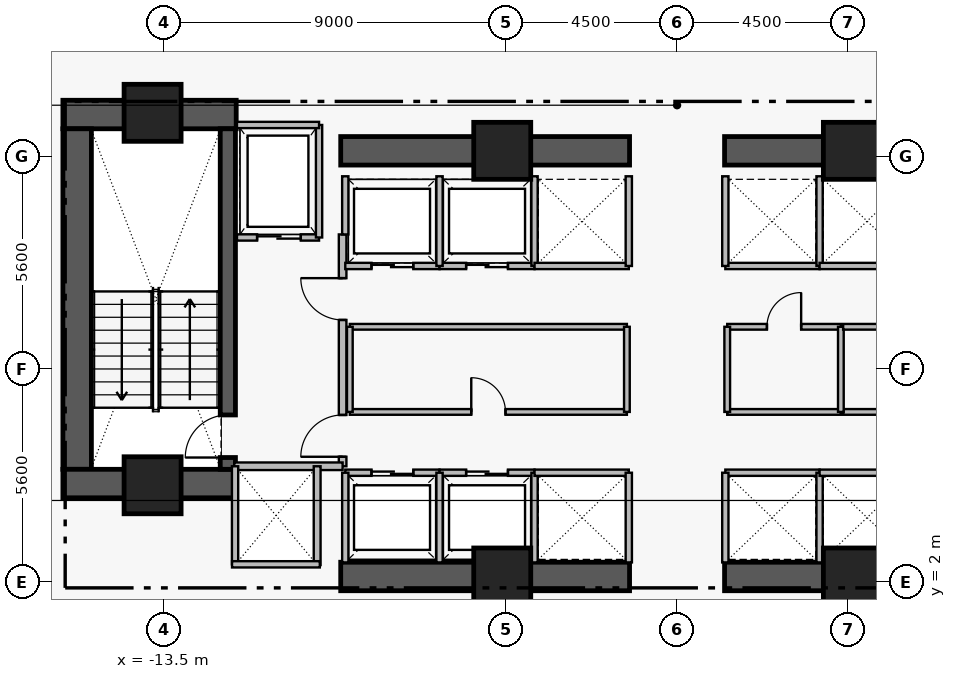
"""IFC4 building model, lengths in metres.
Left out: names, types, materials, properties, quantities, classifications, styles, units other than length and angle.
Written with IfcOpenShell. Run it as: python <this file> out.ifc"""

import sys

from ifc_helpers import new_model, si_unit, direction, frame, frame_2d, origin, origin_2d, place, context, subcontext, project, spatial, rectangle, extrude, element, fill, save


model = new_model("IFC4")
c1 = context("Model", 3, precision=1e-05, world=origin(), true_north=direction((0.0, 1.0)))
c2 = subcontext(c1, "Body", "Model", "MODEL_VIEW")
j1 = project(units=[si_unit("LENGTHUNIT", "METRE"), si_unit("PLANEANGLEUNIT", "RADIAN")], contexts=[c1])
p1 = place(None, origin())
s1 = spatial("IfcSite", under=j1, at=p1, CompositionType="ELEMENT")
p2 = place(p1, origin())
s2 = spatial("IfcBuilding", under=s1, at=p2, CompositionType="ELEMENT")
p3 = place(p2, frame((0.0, 0.0, 121.2)))
s3 = spatial("IfcBuildingStorey", under=s2, at=p3, CompositionType="ELEMENT", Elevation=121.2)
p4 = place(p3, frame((-16.16, 14.305, 0.0), z_axis=(0.0, 0.0, 1.0), x_axis=(1.0, 0.0, 0.0)))
e1 = element("IfcWall", 1, at=p4, inside=s3, PredefinedType="SHEAR", context=c2, shape_type="SweptSolid", body=[
    extrude(rectangle(XDim=4.56, YDim=0.75, at=frame_2d((2.28, 0.0))), origin(), (0.0, 0.0, 1.0), 3.46),
])
p5 = place(p3, frame((-15.785, 4.97, 0.0), z_axis=(0.0, 0.0, 1.0), x_axis=(0.0, 1.0, 0.0)))
e2 = element("IfcWall", 2, at=p5, inside=s3, PredefinedType="SHEAR", context=c2, shape_type="SweptSolid", body=[
    extrude(rectangle(XDim=8.96, YDim=0.75, at=frame_2d((4.48, 0.0))), origin(), (0.0, 0.0, 1.0), 3.46),
])
p6 = place(p3, frame((-16.16, 4.595, 0.0), z_axis=(0.0, 0.0, 1.0), x_axis=(1.0, 0.0, 0.0)))
e3 = element("IfcWall", 3, at=p6, inside=s3, PredefinedType="SHEAR", context=c2, shape_type="SweptSolid", body=[
    extrude(rectangle(XDim=4.56, YDim=0.75, at=frame_2d((2.28, 0.0))), origin(), (0.0, 0.0, 1.0), 3.46),
])
for number, where, z_axis, x_axis in (
    (4, (-8.85, 2.15, 0.0), (0.0, 0.0, 1.0), (1.0, 0.0, 0.0)),
    (5, (1.25, 2.15, 0.0), (0.0, 0.0, 1.0), (1.0, 0.0, 0.0)),
    (6, (-8.85, 13.35, 0.0), (0.0, 0.0, 1.0), (1.0, 0.0, 0.0)),
    (7, (1.25, 13.35, 0.0), (0.0, 0.0, 1.0), (1.0, 0.0, 0.0)),
):
    element("IfcWall", number, at=place(p3, frame(where, z_axis=z_axis, x_axis=x_axis)), inside=s3, PredefinedType="SHEAR", context=c2, shape_type="SweptSolid", body=[
        extrude(rectangle(XDim=7.6, YDim=0.75, at=frame_2d((3.8, 0.0))), origin(), (0.0, 0.0, 1.0), 3.43),
    ])
p7 = place(p3, frame((-11.82, 4.97, 0.0), z_axis=(0.0, 0.0, 1.0), x_axis=(0.0, 1.0, 0.0)))
e8 = element("IfcWall", 8, at=p7, inside=s3, PredefinedType="SHEAR", context=c2, shape_type="SweptSolid", body=[
    extrude(rectangle(XDim=8.96, YDim=0.4, at=frame_2d((4.48, 0.0))), origin(), (0.0, 0.0, 1.0), 3.46),
])
p8 = place(p7, frame((0.31, 0.0, 0.0)))
e9 = element("IfcOpeningElement", 9, at=p8, cuts=e8, PredefinedType="OPENING", context=c2, shape_type="SweptSolid", body=[
    extrude(rectangle(XDim=1.12, YDim=2.22, at=frame_2d((0.56, 1.11))), frame((0.0, 0.21, 0.0), z_axis=(0.0, -1.0, 0.0), x_axis=(1.0, 0.0, 0.0)), (0.0, 0.0, 1.0), 0.42),
])
for number, where, z_axis, x_axis in (
    (10, (-13.8, 14.35, 0.0), (0.0, 0.0, 1.0), (1.0, 0.0, 0.0)),
    (11, (-4.6, 13.35, 0.0), (0.0, 0.0, 1.0), (1.0, 0.0, 0.0)),
    (12, (4.6, 13.35, 0.0), (0.0, 0.0, 1.0), (1.0, 0.0, 0.0)),
    (13, (-13.8, 4.55, 0.0), (0.0, 0.0, 1.0), (1.0, 0.0, 0.0)),
    (14, (-4.6, 2.15, 0.0), (0.0, 0.0, 1.0), (1.0, 0.0, 0.0)),
    (15, (4.6, 2.15, 0.0), (0.0, 0.0, 1.0), (1.0, 0.0, 0.0)),
):
    element("IfcColumn", number, at=place(p3, frame(where, z_axis=z_axis, x_axis=x_axis)), inside=s3, PredefinedType="COLUMN", context=c2, shape_type="SweptSolid", body=[
        extrude(rectangle(XDim=1.5, YDim=1.5, at=origin_2d()), origin(), (0.0, 0.0, 1.0), 3.65),
    ])
p9 = place(p3, frame((-8.8, 5.05, 0.0), z_axis=(0.0, 0.0, 1.0), x_axis=(0.0, 1.0, 0.0)))
e16 = element("IfcWall", 16, at=p9, inside=s3, PredefinedType="PARTITIONING", context=c2, shape_type="SweptSolid", body=[
    extrude(rectangle(XDim=6.1, YDim=0.2, at=frame_2d((3.05, 0.0))), origin(), (0.0, 0.0, 1.0), 3.43),
])
p10 = place(p9, frame((0.25, 0.0, 0.0)))
e17 = element("IfcOpeningElement", 17, at=p10, cuts=e16, PredefinedType="OPENING", context=c2, shape_type="SweptSolid", body=[
    extrude(rectangle(XDim=1.1, YDim=2.2, at=frame_2d((0.55, 1.1))), frame((0.0, 0.11, 0.0), z_axis=(0.0, -1.0, 0.0), x_axis=(1.0, 0.0, 0.0)), (0.0, 0.0, 1.0), 0.22),
])
p11 = place(p9, frame((3.85, 0.0, 0.0)))
e18 = element("IfcOpeningElement", 18, at=p11, cuts=e16, PredefinedType="OPENING", context=c2, shape_type="SweptSolid", body=[
    extrude(rectangle(XDim=1.1, YDim=2.2, at=frame_2d((0.55, 1.1))), frame((0.0, 0.11, 0.0), z_axis=(0.0, -1.0, 0.0), x_axis=(1.0, 0.0, 0.0)), (0.0, 0.0, 1.0), 0.22),
])
p12 = place(p3, frame((-11.58, 11.07, 0.0), z_axis=(0.0, 0.0, 1.0), x_axis=(1.0, 0.0, 0.0)))
e19 = element("IfcWall", 19, at=p12, inside=s3, PredefinedType="PARTITIONING", context=c2, shape_type="SweptSolid", body=[
    extrude(rectangle(XDim=2.16, YDim=0.165, at=frame_2d((1.08, 0.0))), origin(), (0.0, 0.0, 1.0), 3.43),
])
p13 = place(p12, frame((0.53, 0.0, 0.0)))
e20 = element("IfcOpeningElement", 20, at=p13, cuts=e19, PredefinedType="OPENING", context=c2, shape_type="SweptSolid", body=[
    extrude(rectangle(XDim=1.15, YDim=2.25, at=frame_2d((0.575, 1.125))), frame((0.0, 0.093, 0.0), z_axis=(0.0, -1.0, 0.0), x_axis=(1.0, 0.0, 0.0)), (0.0, 0.0, 1.0), 0.185),
])
p14 = place(p3, frame((-8.73, 4.88, 0.0), z_axis=(0.0, 0.0, 1.0), x_axis=(1.0, 0.0, 0.0)))
e21 = element("IfcWall", 21, at=p14, inside=s3, PredefinedType="PARTITIONING", context=c2, shape_type="SweptSolid", body=[
    extrude(rectangle(XDim=2.48, YDim=0.165, at=frame_2d((1.24, 0.0))), origin(), (0.0, 0.0, 1.0), 3.43),
])
p15 = place(p14, frame((0.69, 0.0, 0.0)))
e22 = element("IfcOpeningElement", 22, at=p15, cuts=e21, PredefinedType="OPENING", context=c2, shape_type="SweptSolid", body=[
    extrude(rectangle(XDim=1.1, YDim=2.25, at=frame_2d((0.55, 1.125))), frame((0.0, 0.093, 0.0), z_axis=(0.0, -1.0, 0.0), x_axis=(1.0, 0.0, 0.0)), (0.0, 0.0, 1.0), 0.185),
])
p16 = place(p3, frame((-6.25, 4.88, 0.0), z_axis=(0.0, 0.0, 1.0), x_axis=(1.0, 0.0, 0.0)))
e23 = element("IfcWall", 23, at=p16, inside=s3, PredefinedType="PARTITIONING", context=c2, shape_type="SweptSolid", body=[
    extrude(rectangle(XDim=2.5, YDim=0.165, at=frame_2d((1.25, 0.0))), origin(), (0.0, 0.0, 1.0), 3.43),
])
p17 = place(p16, frame((0.7, 0.0, 0.0)))
e24 = element("IfcOpeningElement", 24, at=p17, cuts=e23, PredefinedType="OPENING", context=c2, shape_type="SweptSolid", body=[
    extrude(rectangle(XDim=1.1, YDim=2.25, at=frame_2d((0.55, 1.125))), frame((0.0, 0.093, 0.0), z_axis=(0.0, -1.0, 0.0), x_axis=(1.0, 0.0, 0.0)), (0.0, 0.0, 1.0), 0.185),
])
p18 = place(p3, frame((-8.73, 10.32, 0.0), z_axis=(0.0, 0.0, 1.0), x_axis=(1.0, 0.0, 0.0)))
e25 = element("IfcWall", 25, at=p18, inside=s3, PredefinedType="PARTITIONING", context=c2, shape_type="SweptSolid", body=[
    extrude(rectangle(XDim=2.48, YDim=0.165, at=frame_2d((1.24, 0.0))), origin(), (0.0, 0.0, 1.0), 3.43),
])
p19 = place(p18, frame((0.69, 0.0, 0.0)))
e26 = element("IfcOpeningElement", 26, at=p19, cuts=e25, PredefinedType="OPENING", context=c2, shape_type="SweptSolid", body=[
    extrude(rectangle(XDim=1.1, YDim=2.25, at=frame_2d((0.55, 1.125))), frame((0.0, 0.093, 0.0), z_axis=(0.0, -1.0, 0.0), x_axis=(1.0, 0.0, 0.0)), (0.0, 0.0, 1.0), 0.185),
])
p20 = place(p3, frame((-6.25, 10.32, 0.0), z_axis=(0.0, 0.0, 1.0), x_axis=(1.0, 0.0, 0.0)))
e27 = element("IfcWall", 27, at=p20, inside=s3, PredefinedType="PARTITIONING", context=c2, shape_type="SweptSolid", body=[
    extrude(rectangle(XDim=2.5, YDim=0.165, at=frame_2d((1.25, 0.0))), origin(), (0.0, 0.0, 1.0), 3.43),
])
p21 = place(p20, frame((0.7, 0.0, 0.0)))
e28 = element("IfcOpeningElement", 28, at=p21, cuts=e27, PredefinedType="OPENING", context=c2, shape_type="SweptSolid", body=[
    extrude(rectangle(XDim=1.1, YDim=2.25, at=frame_2d((0.55, 1.125))), frame((0.0, 0.093, 0.0), z_axis=(0.0, -1.0, 0.0), x_axis=(1.0, 0.0, 0.0)), (0.0, 0.0, 1.0), 0.185),
])
p22 = place(p3, frame((-8.61, 6.48, 0.0), z_axis=(0.0, 0.0, 1.0), x_axis=(1.0, 0.0, 0.0)))
e29 = element("IfcWall", 29, at=p22, inside=s3, PredefinedType="PARTITIONING", context=c2, shape_type="SweptSolid", body=[
    extrude(rectangle(XDim=7.29, YDim=0.15, at=frame_2d((3.645, 0.0))), origin(), (0.0, 0.0, 1.0), 3.43),
])
p23 = place(p22, frame((3.195, 0.0, 0.0)))
e30 = element("IfcOpeningElement", 30, at=p23, cuts=e29, PredefinedType="OPENING", context=c2, shape_type="SweptSolid", body=[
    extrude(rectangle(XDim=0.9, YDim=2.15, at=frame_2d((0.45, 1.075))), frame((0.0, 0.085, 0.0), z_axis=(0.0, -1.0, 0.0), x_axis=(1.0, 0.0, 0.0)), (0.0, 0.0, 1.0), 0.17),
])
p24 = place(p3, frame((1.32, 8.72, 0.0), z_axis=(0.0, 0.0, 1.0), x_axis=(1.0, 0.0, 0.0)))
e31 = element("IfcWall", 31, at=p24, inside=s3, PredefinedType="PARTITIONING", context=c2, shape_type="SweptSolid", body=[
    extrude(rectangle(XDim=2.99, YDim=0.15, at=frame_2d((1.495, 0.0))), origin(), (0.0, 0.0, 1.0), 3.43),
])
p25 = place(p24, frame((1.045, 0.0, 0.0)))
e32 = element("IfcOpeningElement", 32, at=p25, cuts=e31, PredefinedType="OPENING", context=c2, shape_type="SweptSolid", body=[
    extrude(rectangle(XDim=0.9, YDim=2.15, at=frame_2d((0.45, 1.075))), frame((0.0, 0.085, 0.0), z_axis=(0.0, -1.0, 0.0), x_axis=(1.0, 0.0, 0.0)), (0.0, 0.0, 1.0), 0.17),
])
p26 = place(p3, frame((4.37, 6.48, 0.0), z_axis=(0.0, 0.0, 1.0), x_axis=(1.0, 0.0, 0.0)))
e33 = element("IfcWall", 33, at=p26, inside=s3, PredefinedType="PARTITIONING", context=c2, shape_type="SweptSolid", body=[
    extrude(rectangle(XDim=4.24, YDim=0.15, at=frame_2d((2.12, 0.0))), origin(), (0.0, 0.0, 1.0), 3.43),
])
p27 = place(p26, frame((1.67, 0.0, 0.0)))
e34 = element("IfcOpeningElement", 34, at=p27, cuts=e33, PredefinedType="OPENING", context=c2, shape_type="SweptSolid", body=[
    extrude(rectangle(XDim=0.9, YDim=2.15, at=frame_2d((0.45, 1.075))), frame((0.0, 0.085, 0.0), z_axis=(0.0, -1.0, 0.0), x_axis=(1.0, 0.0, 0.0)), (0.0, 0.0, 1.0), 0.17),
])
p28 = place(p3, frame((-11.65, 5.05, 0.0), z_axis=(0.0, 0.0, 1.0), x_axis=(1.0, 0.0, 0.0)))
e35 = element("IfcWall", 35, at=p28, inside=s3, PredefinedType="PARTITIONING", context=c2, shape_type="SweptSolid", body=[
    extrude(rectangle(XDim=2.85, YDim=0.2, at=frame_2d((1.425, 0.0))), origin(), (0.0, 0.0, 1.0), 3.43),
])
p29 = place(p3, frame((-9.42, 11.07, 0.0), z_axis=(0.0, 0.0, 1.0), x_axis=(0.0, 1.0, 0.0)))
e36 = element("IfcWall", 36, at=p29, inside=s3, PredefinedType="PARTITIONING", context=c2, shape_type="SweptSolid", body=[
    extrude(rectangle(XDim=2.96, YDim=0.165, at=frame_2d((1.48, 0.0))), origin(), (0.0, 0.0, 1.0), 3.43),
])
p30 = place(p3, frame((-11.58, 14.03, 0.0), z_axis=(0.0, 0.0, 1.0), x_axis=(1.0, 0.0, 0.0)))
e37 = element("IfcWall", 37, at=p30, inside=s3, PredefinedType="PARTITIONING", context=c2, shape_type="SweptSolid", body=[
    extrude(rectangle(XDim=2.16, YDim=0.165, at=frame_2d((1.08, 0.0))), origin(), (0.0, 0.0, 1.0), 3.43),
])
for number, where, z_axis, x_axis in (
    (38, (-8.73, 2.52, 0.0), (0.0, 0.0, 1.0), (0.0, 1.0, 0.0)),
    (39, (-6.25, 2.52, 0.0), (0.0, 0.0, 1.0), (0.0, 1.0, 0.0)),
    (40, (-3.75, 2.52, 0.0), (0.0, 0.0, 1.0), (0.0, 1.0, 0.0)),
):
    element("IfcWall", number, at=place(p3, frame(where, z_axis=z_axis, x_axis=x_axis)), inside=s3, PredefinedType="PARTITIONING", context=c2, shape_type="SweptSolid", body=[
        extrude(rectangle(XDim=2.36, YDim=0.165, at=frame_2d((1.18, 0.0))), origin(), (0.0, 0.0, 1.0), 3.43),
    ])
p31 = place(p3, frame((-8.73, 11.15, 0.0), z_axis=(0.0, 0.0, 1.0), x_axis=(0.0, 1.0, 0.0)))
e41 = element("IfcWall", 41, at=p31, inside=s3, PredefinedType="PARTITIONING", context=c2, shape_type="SweptSolid", body=[
    extrude(rectangle(XDim=1.53, YDim=0.165, at=frame_2d((0.765, 0.0))), origin(), (0.0, 0.0, 1.0), 3.43),
])
for number, where, z_axis, x_axis in (
    (42, (-6.25, 10.32, 0.0), (0.0, 0.0, 1.0), (0.0, 1.0, 0.0)),
    (43, (-3.75, 10.32, 0.0), (0.0, 0.0, 1.0), (0.0, 1.0, 0.0)),
):
    element("IfcWall", number, at=place(p3, frame(where, z_axis=z_axis, x_axis=x_axis)), inside=s3, PredefinedType="PARTITIONING", context=c2, shape_type="SweptSolid", body=[
        extrude(rectangle(XDim=2.36, YDim=0.165, at=frame_2d((1.18, 0.0))), origin(), (0.0, 0.0, 1.0), 3.43),
    ])
p32 = place(p3, frame((-3.75, 4.88, 0.0), z_axis=(0.0, 0.0, 1.0), x_axis=(1.0, 0.0, 0.0)))
e44 = element("IfcWall", 44, at=p32, inside=s3, PredefinedType="PARTITIONING", context=c2, shape_type="SweptSolid", body=[
    extrude(rectangle(XDim=2.48, YDim=0.165, at=frame_2d((1.24, 0.0))), origin(), (0.0, 0.0, 1.0), 3.43),
])
p33 = place(p3, frame((-1.27, 2.52, 0.0), z_axis=(0.0, 0.0, 1.0), x_axis=(0.0, 1.0, 0.0)))
e45 = element("IfcWall", 45, at=p33, inside=s3, PredefinedType="PARTITIONING", context=c2, shape_type="SweptSolid", body=[
    extrude(rectangle(XDim=2.36, YDim=0.165, at=frame_2d((1.18, 0.0))), origin(), (0.0, 0.0, 1.0), 3.43),
])
p34 = place(p3, frame((1.27, 4.88, 0.0), z_axis=(0.0, 0.0, 1.0), x_axis=(1.0, 0.0, 0.0)))
e46 = element("IfcWall", 46, at=p34, inside=s3, PredefinedType="PARTITIONING", context=c2, shape_type="SweptSolid", body=[
    extrude(rectangle(XDim=2.48, YDim=0.165, at=frame_2d((1.24, 0.0))), origin(), (0.0, 0.0, 1.0), 3.43),
])
for number, where, z_axis, x_axis in (
    (47, (1.27, 2.52, 0.0), (0.0, 0.0, 1.0), (0.0, 1.0, 0.0)),
    (48, (3.75, 2.52, 0.0), (0.0, 0.0, 1.0), (0.0, 1.0, 0.0)),
):
    element("IfcWall", number, at=place(p3, frame(where, z_axis=z_axis, x_axis=x_axis)), inside=s3, PredefinedType="PARTITIONING", context=c2, shape_type="SweptSolid", body=[
        extrude(rectangle(XDim=2.36, YDim=0.165, at=frame_2d((1.18, 0.0))), origin(), (0.0, 0.0, 1.0), 3.43),
    ])
p35 = place(p3, frame((-3.75, 10.32, 0.0), z_axis=(0.0, 0.0, 1.0), x_axis=(1.0, 0.0, 0.0)))
e49 = element("IfcWall", 49, at=p35, inside=s3, PredefinedType="PARTITIONING", context=c2, shape_type="SweptSolid", body=[
    extrude(rectangle(XDim=2.48, YDim=0.165, at=frame_2d((1.24, 0.0))), origin(), (0.0, 0.0, 1.0), 3.43),
])
p36 = place(p3, frame((-1.27, 10.32, 0.0), z_axis=(0.0, 0.0, 1.0), x_axis=(0.0, 1.0, 0.0)))
e50 = element("IfcWall", 50, at=p36, inside=s3, PredefinedType="PARTITIONING", context=c2, shape_type="SweptSolid", body=[
    extrude(rectangle(XDim=2.36, YDim=0.165, at=frame_2d((1.18, 0.0))), origin(), (0.0, 0.0, 1.0), 3.43),
])
p37 = place(p3, frame((1.27, 10.32, 0.0), z_axis=(0.0, 0.0, 1.0), x_axis=(1.0, 0.0, 0.0)))
e51 = element("IfcWall", 51, at=p37, inside=s3, PredefinedType="PARTITIONING", context=c2, shape_type="SweptSolid", body=[
    extrude(rectangle(XDim=2.48, YDim=0.165, at=frame_2d((1.24, 0.0))), origin(), (0.0, 0.0, 1.0), 3.43),
])
for number, where, z_axis, x_axis in (
    (52, (1.27, 10.32, 0.0), (0.0, 0.0, 1.0), (0.0, 1.0, 0.0)),
    (53, (3.75, 10.32, 0.0), (0.0, 0.0, 1.0), (0.0, 1.0, 0.0)),
):
    element("IfcWall", number, at=place(p3, frame(where, z_axis=z_axis, x_axis=x_axis)), inside=s3, PredefinedType="PARTITIONING", context=c2, shape_type="SweptSolid", body=[
        extrude(rectangle(XDim=2.36, YDim=0.165, at=frame_2d((1.18, 0.0))), origin(), (0.0, 0.0, 1.0), 3.43),
    ])
for number, where, z_axis, x_axis in (
    (54, (3.75, 4.88, 0.0), (0.0, 0.0, 1.0), (1.0, 0.0, 0.0)),
    (55, (3.75, 10.32, 0.0), (0.0, 0.0, 1.0), (1.0, 0.0, 0.0)),
):
    element("IfcWall", number, at=place(p3, frame(where, z_axis=z_axis, x_axis=x_axis)), inside=s3, PredefinedType="PARTITIONING", context=c2, shape_type="SweptSolid", body=[
        extrude(rectangle(XDim=2.5, YDim=0.165, at=frame_2d((1.25, 0.0))), origin(), (0.0, 0.0, 1.0), 3.43),
    ])
p38 = place(p3, frame((-9.47, 2.45, 0.0), z_axis=(0.0, 0.0, 1.0), x_axis=(0.0, 1.0, 0.0)))
e56 = element("IfcWall", 56, at=p38, inside=s3, PredefinedType="PARTITIONING", context=c2, shape_type="SweptSolid", body=[
    extrude(rectangle(XDim=2.6, YDim=0.18, at=frame_2d((1.3, 0.0))), origin(), (0.0, 0.0, 1.0), 3.43),
])
p39 = place(p3, frame((-11.63, 2.47, 0.0), z_axis=(0.0, 0.0, 1.0), x_axis=(0.0, 1.0, 0.0)))
e57 = element("IfcWall", 57, at=p39, inside=s3, PredefinedType="PARTITIONING", context=c2, shape_type="SweptSolid", body=[
    extrude(rectangle(XDim=2.58, YDim=0.165, at=frame_2d((1.29, 0.0))), origin(), (0.0, 0.0, 1.0), 3.43),
])
p40 = place(p3, frame((-11.71, 2.47, 0.0), z_axis=(0.0, 0.0, 1.0), x_axis=(1.0, 0.0, 0.0)))
e58 = element("IfcWall", 58, at=p40, inside=s3, PredefinedType="PARTITIONING", context=c2, shape_type="SweptSolid", body=[
    extrude(rectangle(XDim=2.31, YDim=0.165, at=frame_2d((1.155, 0.0))), origin(), (0.0, 0.0, 1.0), 2.03),
])
p41 = place(p3, frame((-8.61, 8.72, 0.0), z_axis=(0.0, 0.0, 1.0), x_axis=(1.0, 0.0, 0.0)))
e59 = element("IfcWall", 59, at=p41, inside=s3, PredefinedType="PARTITIONING", context=c2, shape_type="SweptSolid", body=[
    extrude(rectangle(XDim=7.29, YDim=0.15, at=frame_2d((3.645, 0.0))), origin(), (0.0, 0.0, 1.0), 3.43),
])
for number, where, z_axis, x_axis in (
    (60, (-8.61, 6.48, 0.0), (0.0, 0.0, 1.0), (0.0, 1.0, 0.0)),
    (61, (-1.32, 6.48, 0.0), (0.0, 0.0, 1.0), (0.0, 1.0, 0.0)),
):
    element("IfcWall", number, at=place(p3, frame(where, z_axis=z_axis, x_axis=x_axis)), inside=s3, PredefinedType="PARTITIONING", context=c2, shape_type="SweptSolid", body=[
        extrude(rectangle(XDim=2.24, YDim=0.15, at=frame_2d((1.12, 0.0))), origin(), (0.0, 0.0, 1.0), 3.43),
    ])
p42 = place(p3, frame((1.32, 6.48, 0.0), z_axis=(0.0, 0.0, 1.0), x_axis=(1.0, 0.0, 0.0)))
e62 = element("IfcWall", 62, at=p42, inside=s3, PredefinedType="PARTITIONING", context=c2, shape_type="SweptSolid", body=[
    extrude(rectangle(XDim=2.99, YDim=0.15, at=frame_2d((1.495, 0.0))), origin(), (0.0, 0.0, 1.0), 3.43),
])
for number, where, z_axis, x_axis in (
    (63, (1.32, 6.48, 0.0), (0.0, 0.0, 1.0), (0.0, 1.0, 0.0)),
    (64, (4.31, 6.48, 0.0), (0.0, 0.0, 1.0), (0.0, 1.0, 0.0)),
):
    element("IfcWall", number, at=place(p3, frame(where, z_axis=z_axis, x_axis=x_axis)), inside=s3, PredefinedType="PARTITIONING", context=c2, shape_type="SweptSolid", body=[
        extrude(rectangle(XDim=2.24, YDim=0.15, at=frame_2d((1.12, 0.0))), origin(), (0.0, 0.0, 1.0), 3.43),
    ])
p43 = place(p3, frame((4.37, 8.72, 0.0), z_axis=(0.0, 0.0, 1.0), x_axis=(1.0, 0.0, 0.0)))
e65 = element("IfcWall", 65, at=p43, inside=s3, PredefinedType="PARTITIONING", context=c2, shape_type="SweptSolid", body=[
    extrude(rectangle(XDim=4.24, YDim=0.15, at=frame_2d((2.12, 0.0))), origin(), (0.0, 0.0, 1.0), 3.43),
])
p44 = place(p8, origin())
e66 = element("IfcDoor", 66, at=p44, inside=s3, OperationType="SINGLE_SWING_LEFT", PredefinedType="DOOR", context=c2, shape_type="SweptSolid", body=[
    extrude(rectangle(XDim=1.12, YDim=2.22, at=frame_2d((0.56, 1.11))), frame((0.0, 0.025, 0.0), z_axis=(0.0, -1.0, 0.0), x_axis=(1.0, 0.0, 0.0)), (0.0, 0.0, 1.0), 0.05),
])
fill(e9, e66)
p45 = place(p10, origin())
e67 = element("IfcDoor", 67, at=p45, inside=s3, OperationType="SINGLE_SWING_LEFT", PredefinedType="DOOR", context=c2, shape_type="SweptSolid", body=[
    extrude(rectangle(XDim=1.1, YDim=2.2, at=frame_2d((0.55, 1.1))), frame((0.0, 0.025, 0.0), z_axis=(0.0, -1.0, 0.0), x_axis=(1.0, 0.0, 0.0)), (0.0, 0.0, 1.0), 0.05),
])
fill(e17, e67)
p46 = place(p11, origin())
e68 = element("IfcDoor", 68, at=p46, inside=s3, OperationType="SINGLE_SWING_RIGHT", PredefinedType="DOOR", context=c2, shape_type="SweptSolid", body=[
    extrude(rectangle(XDim=1.1, YDim=2.2, at=frame_2d((0.55, 1.1))), frame((0.0, 0.025, 0.0), z_axis=(0.0, -1.0, 0.0), x_axis=(1.0, 0.0, 0.0)), (0.0, 0.0, 1.0), 0.05),
])
fill(e18, e68)
p47 = place(p13, origin())
e69 = element("IfcDoor", 69, at=p47, inside=s3, OperationType="SLIDING_TO_LEFT", PredefinedType="DOOR", context=c2, shape_type="SweptSolid", body=[
    extrude(rectangle(XDim=1.15, YDim=2.25, at=frame_2d((0.575, 1.125))), frame((0.0, 0.025, 0.0), z_axis=(0.0, -1.0, 0.0), x_axis=(1.0, 0.0, 0.0)), (0.0, 0.0, 1.0), 0.05),
])
fill(e20, e69)
p48 = place(p15, origin())
e70 = element("IfcDoor", 70, at=p48, inside=s3, OperationType="SLIDING_TO_LEFT", PredefinedType="DOOR", context=c2, shape_type="SweptSolid", body=[
    extrude(rectangle(XDim=1.1, YDim=2.25, at=frame_2d((0.55, 1.125))), frame((0.0, 0.025, 0.0), z_axis=(0.0, -1.0, 0.0), x_axis=(1.0, 0.0, 0.0)), (0.0, 0.0, 1.0), 0.05),
])
fill(e22, e70)
p49 = place(p17, origin())
e71 = element("IfcDoor", 71, at=p49, inside=s3, OperationType="SLIDING_TO_LEFT", PredefinedType="DOOR", context=c2, shape_type="SweptSolid", body=[
    extrude(rectangle(XDim=1.1, YDim=2.25, at=frame_2d((0.55, 1.125))), frame((0.0, 0.025, 0.0), z_axis=(0.0, -1.0, 0.0), x_axis=(1.0, 0.0, 0.0)), (0.0, 0.0, 1.0), 0.05),
])
fill(e24, e71)
p50 = place(p19, origin())
e72 = element("IfcDoor", 72, at=p50, inside=s3, OperationType="SLIDING_TO_LEFT", PredefinedType="DOOR", context=c2, shape_type="SweptSolid", body=[
    extrude(rectangle(XDim=1.1, YDim=2.25, at=frame_2d((0.55, 1.125))), frame((0.0, 0.025, 0.0), z_axis=(0.0, -1.0, 0.0), x_axis=(1.0, 0.0, 0.0)), (0.0, 0.0, 1.0), 0.05),
])
fill(e26, e72)
p51 = place(p21, origin())
e73 = element("IfcDoor", 73, at=p51, inside=s3, OperationType="SLIDING_TO_LEFT", PredefinedType="DOOR", context=c2, shape_type="SweptSolid", body=[
    extrude(rectangle(XDim=1.1, YDim=2.25, at=frame_2d((0.55, 1.125))), frame((0.0, 0.025, 0.0), z_axis=(0.0, -1.0, 0.0), x_axis=(1.0, 0.0, 0.0)), (0.0, 0.0, 1.0), 0.05),
])
fill(e28, e73)
p52 = place(p23, origin())
e74 = element("IfcDoor", 74, at=p52, inside=s3, OperationType="SINGLE_SWING_LEFT", PredefinedType="DOOR", context=c2, shape_type="SweptSolid", body=[
    extrude(rectangle(XDim=0.9, YDim=2.15, at=frame_2d((0.45, 1.075))), frame((0.0, 0.025, 0.0), z_axis=(0.0, -1.0, 0.0), x_axis=(1.0, 0.0, 0.0)), (0.0, 0.0, 1.0), 0.05),
])
fill(e30, e74)
p53 = place(p25, origin())
e75 = element("IfcDoor", 75, at=p53, inside=s3, OperationType="SINGLE_SWING_RIGHT", PredefinedType="DOOR", context=c2, shape_type="SweptSolid", body=[
    extrude(rectangle(XDim=0.9, YDim=2.15, at=frame_2d((0.45, 1.075))), frame((0.0, 0.025, 0.0), z_axis=(0.0, -1.0, 0.0), x_axis=(1.0, 0.0, 0.0)), (0.0, 0.0, 1.0), 0.05),
])
fill(e32, e75)
save(model, sys.argv[1])
